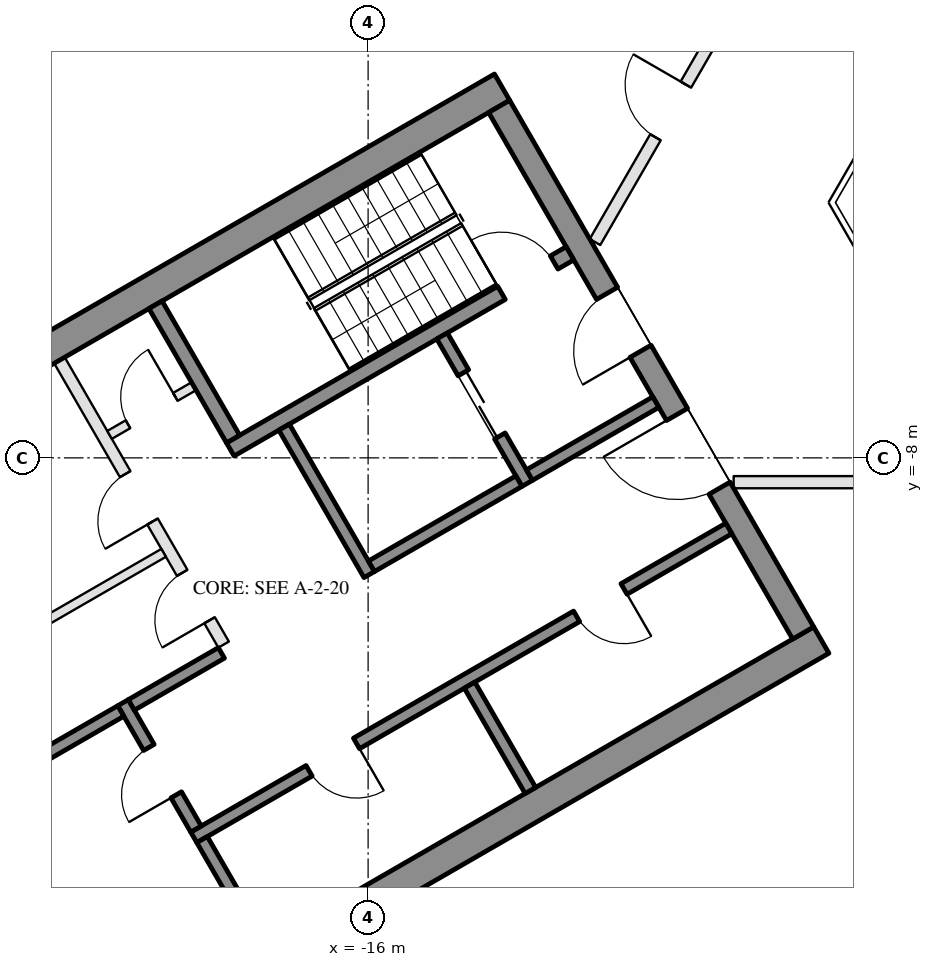
"""IFC4 building model, lengths in metres.
Left out: names, types, materials, properties, quantities, classifications, styles, units other than length and angle.
Written with IfcOpenShell. Run it as: python <this file> out.ifc"""

import sys

from ifc_helpers import new_model, si_unit, direction, frame, frame_2d, origin, place, context, subcontext, project, spatial, rectangle, extrude, element, fill, save


model = new_model("IFC4")
c1 = context("Model", 3, precision=1e-05, world=origin(), true_north=direction((0.0, 1.0)))
c2 = subcontext(c1, "Body", "Model", "MODEL_VIEW")
j1 = project(units=[si_unit("LENGTHUNIT", "METRE"), si_unit("PLANEANGLEUNIT", "RADIAN")], contexts=[c1])
p1 = place(None, origin())
s1 = spatial("IfcSite", under=j1, at=p1, CompositionType="ELEMENT")
p2 = place(p1, origin())
s2 = spatial("IfcBuilding", under=s1, at=p2, CompositionType="ELEMENT")
p3 = place(p2, frame((0.0, 0.0, 94.6)))
s3 = spatial("IfcBuildingStorey", under=s2, at=p3, CompositionType="ELEMENT", Elevation=94.6)
p4 = place(p3, frame((-20.309, 1.934, 0.0), z_axis=(0.0, 0.0, 1.0), x_axis=(-0.499992114976, -0.866029956157, 0.0)))
e1 = element("IfcWall", 1, at=p4, inside=s3, PredefinedType="SOLIDWALL", context=c2, shape_type="SweptSolid", body=[
    extrude(rectangle(XDim=6.74, YDim=0.35, at=frame_2d((3.37, 0.0))), origin(), (0.0, 0.0, 1.0), 3.55),
])
p5 = place(p4, frame((4.02, 0.0, 0.0)))
e2 = element("IfcOpeningElement", 2, at=p5, cuts=e1, PredefinedType="OPENING", context=c2, shape_type="SweptSolid", body=[
    extrude(rectangle(XDim=2.4, YDim=2.4, at=frame_2d((1.2, 1.2))), frame((0.0, 0.185, 0.0), z_axis=(0.0, -1.0, 0.0), x_axis=(1.0, 0.0, 0.0)), (0.0, 0.0, 1.0), 0.37),
])
p6 = place(p4, frame((0.77, 0.0, 0.3)))
e3 = element("IfcOpeningElement", 3, at=p6, cuts=e1, PredefinedType="OPENING", context=c2, shape_type="SweptSolid", body=[
    extrude(rectangle(XDim=2.9, YDim=2.65, at=frame_2d((1.45, 1.325))), frame((0.0, 0.185, 0.0), z_axis=(0.0, -1.0, 0.0), x_axis=(1.0, 0.0, 0.0)), (0.0, 0.0, 1.0), 0.37),
])
for number, where, z_axis, x_axis in (
    (4, (-13.797, -1.903, 0.0), (0.0, 0.0, 1.0), (-0.866, -0.5, 0.0)),
    (5, (-8.547, -10.997, 0.0), (0.0, 0.0, 1.0), (-0.866, -0.5, 0.0)),
):
    element("IfcWall", number, at=place(p3, frame(where, z_axis=z_axis, x_axis=x_axis)), inside=s3, PredefinedType="SHEAR", context=c2, shape_type="SweptSolid", body=[
        extrude(rectangle(XDim=14.837, YDim=0.5, at=frame_2d((7.418, 0.0))), origin(), (0.0, 0.0, 1.0), 3.5),
    ])
p7 = place(p3, frame((-13.845, -2.22, 0.0), z_axis=(0.0, 0.0, 1.0), x_axis=(0.500004234368, -0.866022959057, 0.0)))
e6 = element("IfcWall", 6, at=p7, inside=s3, PredefinedType="SHEAR", context=c2, shape_type="SweptSolid", body=[
    extrude(rectangle(XDim=10.0, YDim=0.4, at=frame_2d((5.0, 0.0))), origin(), (0.0, 0.0, 1.0), 3.5),
])
p8 = place(p7, frame((3.55, 0.0, 0.0)))
e7 = element("IfcOpeningElement", 7, at=p8, cuts=e6, PredefinedType="OPENING", context=c2, shape_type="SweptSolid", body=[
    extrude(rectangle(XDim=1.1, YDim=2.1, at=frame_2d((0.55, 1.05))), frame((0.0, 0.21, 0.0), z_axis=(0.0, -1.0, 0.0), x_axis=(1.0, 0.0, 0.0)), (0.0, 0.0, 1.0), 0.42),
])
p9 = place(p7, frame((5.85, 0.0, 0.0)))
e8 = element("IfcOpeningElement", 8, at=p9, cuts=e6, PredefinedType="OPENING", context=c2, shape_type="SweptSolid", body=[
    extrude(rectangle(XDim=1.4, YDim=2.1, at=frame_2d((0.7, 1.05))), frame((0.0, 0.21, 0.0), z_axis=(0.0, -1.0, 0.0), x_axis=(1.0, 0.0, 0.0)), (0.0, 0.0, 1.0), 0.42),
])
p10 = place(p3, frame((-12.681, -4.636, 0.0), z_axis=(0.0, 0.0, 1.0), x_axis=(-0.866021702275, -0.500006411147, 0.0)))
e9 = element("IfcWall", 9, at=p10, inside=s3, PredefinedType="SHEAR", context=c2, shape_type="SweptSolid", body=[
    extrude(rectangle(XDim=6.45, YDim=0.25, at=frame_2d((3.225, 0.0))), origin(), (0.0, 0.0, 1.0), 3.5),
])
p11 = place(p10, frame((0.3, 0.0, 0.0)))
e10 = element("IfcOpeningElement", 10, at=p11, cuts=e9, PredefinedType="OPENING", context=c2, shape_type="SweptSolid", body=[
    extrude(rectangle(XDim=1.0, YDim=2.1, at=frame_2d((0.5, 1.05))), frame((0.0, 0.135, 0.0), z_axis=(0.0, -1.0, 0.0), x_axis=(1.0, 0.0, 0.0)), (0.0, 0.0, 1.0), 0.27),
])
p12 = place(p3, frame((-19.496, -5.482, 0.0), z_axis=(0.0, 0.0, 1.0), x_axis=(0.499990435942, -0.866030925526, 0.0)))
e11 = element("IfcWall", 11, at=p12, inside=s3, PredefinedType="SHEAR", context=c2, shape_type="SweptSolid", body=[
    extrude(rectangle(XDim=2.55, YDim=0.25, at=frame_2d((1.275, 0.0))), origin(), (0.0, 0.0, 1.0), 3.5),
])
p13 = place(p3, frame((-17.381, -7.495, 0.0), z_axis=(0.0, 0.0, 1.0), x_axis=(0.500011755427, -0.866018616679, 0.0)))
e12 = element("IfcWall", 12, at=p13, inside=s3, PredefinedType="SHEAR", context=c2, shape_type="SweptSolid", body=[
    extrude(rectangle(XDim=2.8, YDim=0.2, at=frame_2d((1.4, 0.0))), origin(), (0.0, 0.0, 1.0), 3.5),
])
p14 = place(p3, frame((-14.783, -5.995, 0.0), z_axis=(0.0, 0.0, 1.0), x_axis=(0.49994636267, -0.866056369097, 0.0)))
e13 = element("IfcWall", 13, at=p14, inside=s3, PredefinedType="SHEAR", context=c2, shape_type="SweptSolid", body=[
    extrude(rectangle(XDim=2.8, YDim=0.2, at=frame_2d((1.4, 0.0))), origin(), (0.0, 0.0, 1.0), 3.5),
])
p15 = place(p14, frame((0.7, 0.0, 0.0)))
e14 = element("IfcOpeningElement", 14, at=p15, cuts=e13, PredefinedType="OPENING", context=c2, shape_type="SweptSolid", body=[
    extrude(rectangle(XDim=1.2, YDim=2.1, at=frame_2d((0.6, 1.05))), frame((0.0, 0.11, 0.0), z_axis=(0.0, -1.0, 0.0), x_axis=(1.0, 0.0, 0.0)), (0.0, 0.0, 1.0), 0.22),
])
p16 = place(p3, frame((-13.52, -8.383, 0.0), z_axis=(0.0, 0.0, 1.0), x_axis=(-0.866034573852, -0.49998411664, 0.0)))
e15 = element("IfcWall", 15, at=p16, inside=s3, PredefinedType="SHEAR", context=c2, shape_type="SweptSolid", body=[
    extrude(rectangle(XDim=2.8, YDim=0.2, at=frame_2d((1.4, 0.0))), origin(), (0.0, 0.0, 1.0), 3.5),
])
p17 = place(p3, frame((-11.268, -7.083, 0.0), z_axis=(0.0, 0.0, 1.0), x_axis=(-0.866050077142, -0.499957262057, 0.0)))
e16 = element("IfcWall", 16, at=p17, inside=s3, PredefinedType="SHEAR", context=c2, shape_type="SweptSolid", body=[
    extrude(rectangle(XDim=2.4, YDim=0.2, at=frame_2d((1.2, 0.0))), origin(), (0.0, 0.0, 1.0), 3.5),
])
p18 = place(p3, frame((-10.068, -9.162, 0.0), z_axis=(0.0, 0.0, 1.0), x_axis=(-0.866032725843, -0.499987317609, 0.0)))
e17 = element("IfcWall", 17, at=p18, inside=s3, PredefinedType="SHEAR", context=c2, shape_type="SweptSolid", body=[
    extrude(rectangle(XDim=10.16, YDim=0.2, at=frame_2d((5.08, 0.0))), origin(), (0.0, 0.0, 1.0), 3.5),
])
p19 = place(p18, frame((1.99, 0.0, 0.0)))
e18 = element("IfcOpeningElement", 18, at=p19, cuts=e17, PredefinedType="OPENING", context=c2, shape_type="SweptSolid", body=[
    extrude(rectangle(XDim=0.9, YDim=2.1, at=frame_2d((0.45, 1.05))), frame((0.0, 0.11, 0.0), z_axis=(0.0, -1.0, 0.0), x_axis=(1.0, 0.0, 0.0)), (0.0, 0.0, 1.0), 0.22),
])
p20 = place(p18, frame((7.07, 0.0, 0.0)))
e19 = element("IfcOpeningElement", 19, at=p20, cuts=e17, PredefinedType="OPENING", context=c2, shape_type="SweptSolid", body=[
    extrude(rectangle(XDim=0.9, YDim=2.1, at=frame_2d((0.45, 1.05))), frame((0.0, 0.11, 0.0), z_axis=(0.0, -1.0, 0.0), x_axis=(1.0, 0.0, 0.0)), (0.0, 0.0, 1.0), 0.22),
])
p21 = place(p3, frame((-20.031, -12.026, 0.0), z_axis=(0.0, 0.0, 1.0), x_axis=(0.500033551112, -0.866006032174, 0.0)))
e20 = element("IfcWall", 20, at=p21, inside=s3, PredefinedType="SHEAR", context=c2, shape_type="SweptSolid", body=[
    extrude(rectangle(XDim=2.4, YDim=0.2, at=frame_2d((1.2, 0.0))), origin(), (0.0, 0.0, 1.0), 3.5),
])
p22 = place(p21, frame((0.85, 0.0, 0.0)))
e21 = element("IfcOpeningElement", 21, at=p22, cuts=e20, PredefinedType="OPENING", context=c2, shape_type="SweptSolid", body=[
    extrude(rectangle(XDim=0.9, YDim=2.1, at=frame_2d((0.45, 1.05))), frame((0.0, 0.11, 0.0), z_axis=(0.0, -1.0, 0.0), x_axis=(1.0, 0.0, 0.0)), (0.0, 0.0, 1.0), 0.22),
])
p23 = place(p3, frame((-18.413, -11.208, 0.0), z_axis=(0.0, 0.0, 1.0), x_axis=(-0.866038183914, -0.499977863513, 0.0)))
e22 = element("IfcWall", 22, at=p23, inside=s3, PredefinedType="SHEAR", context=c2, shape_type="SweptSolid", body=[
    extrude(rectangle(XDim=1.71, YDim=0.2, at=frame_2d((0.855, 0.0))), origin(), (0.0, 0.0, 1.0), 3.5),
])
for number, where, z_axis, x_axis in (
    (23, (-14.331, -11.738, 0.0), (0.0, 0.0, 1.0), (0.5, -0.866, 0.0)),
    (24, (-18.73, -14.278, 0.0), (0.0, 0.0, 1.0), (0.5, -0.866, 0.0)),
):
    element("IfcWall", number, at=place(p3, frame(where, z_axis=z_axis, x_axis=x_axis)), inside=s3, PredefinedType="SHEAR", context=c2, shape_type="SweptSolid", body=[
        extrude(rectangle(XDim=2.0, YDim=0.2, at=frame_2d((1.0, 0.0))), origin(), (0.0, 0.0, 1.0), 3.5),
    ])
p24 = place(p3, frame((-20.067, -12.163, 0.0), z_axis=(0.0, 0.0, 1.0), x_axis=(-0.866060851709, -0.499938597367, 0.0)))
e25 = element("IfcWall", 25, at=p24, inside=s3, PredefinedType="SHEAR", context=c2, shape_type="SweptSolid", body=[
    extrude(rectangle(XDim=2.64, YDim=0.2, at=frame_2d((1.32, 0.0))), origin(), (0.0, 0.0, 1.0), 3.5),
])
p25 = place(p3, frame((-21.076, -6.395, 0.0), z_axis=(0.0, 0.0, 1.0), x_axis=(0.50001468107, -0.866016927499, 0.0)))
e26 = element("IfcWall", 26, at=p25, inside=s3, PredefinedType="PARTITIONING", context=c2, shape_type="SweptSolid", body=[
    extrude(rectangle(XDim=5.4, YDim=0.2, at=frame_2d((2.7, 0.0))), origin(), (0.0, 0.0, 1.0), 3.5),
])
p26 = place(p25, frame((2.163, 0.0, 0.0)))
e27 = element("IfcOpeningElement", 27, at=p26, cuts=e26, PredefinedType="OPENING", context=c2, shape_type="SweptSolid", body=[
    extrude(rectangle(XDim=0.9, YDim=2.1, at=frame_2d((0.45, 1.05))), frame((0.0, 0.11, 0.0), z_axis=(0.0, -1.0, 0.0), x_axis=(1.0, 0.0, 0.0)), (0.0, 0.0, 1.0), 0.22),
])
p27 = place(p25, frame((4.038, 0.0, 0.0)))
e28 = element("IfcOpeningElement", 28, at=p27, cuts=e26, PredefinedType="OPENING", context=c2, shape_type="SweptSolid", body=[
    extrude(rectangle(XDim=0.9, YDim=2.1, at=frame_2d((0.45, 1.05))), frame((0.0, 0.11, 0.0), z_axis=(0.0, -1.0, 0.0), x_axis=(1.0, 0.0, 0.0)), (0.0, 0.0, 1.0), 0.22),
])
p28 = place(p3, frame((-18.866, -6.822, 0.0), z_axis=(0.0, 0.0, 1.0), x_axis=(-0.866028054938, -0.499995408039, 0.0)))
e29 = element("IfcWall", 29, at=p28, inside=s3, PredefinedType="PARTITIONING", context=c2, shape_type="SweptSolid", body=[
    extrude(rectangle(XDim=1.6, YDim=0.15, at=frame_2d((0.8, 0.0))), origin(), (0.0, 0.0, 1.0), 3.5),
])
p29 = place(p28, frame((0.35, 0.0, 0.0)))
e30 = element("IfcOpeningElement", 30, at=p29, cuts=e29, PredefinedType="OPENING", context=c2, shape_type="SweptSolid", body=[
    extrude(rectangle(XDim=0.9, YDim=2.1, at=frame_2d((0.45, 1.05))), frame((0.0, 0.085, 0.0), z_axis=(0.0, -1.0, 0.0), x_axis=(1.0, 0.0, 0.0)), (0.0, 0.0, 1.0), 0.17),
])
p30 = place(p3, frame((-19.363, -9.562, 0.0), z_axis=(0.0, 0.0, 1.0), x_axis=(-0.86601185002, -0.500023475074, 0.0)))
e31 = element("IfcWall", 31, at=p30, inside=s3, PredefinedType="PARTITIONING", context=c2, shape_type="SweptSolid", body=[
    extrude(rectangle(XDim=4.61, YDim=0.15, at=frame_2d((2.305, 0.0))), origin(), (0.0, 0.0, 1.0), 3.5),
])
p31 = place(p3, frame((-3.703, -8.4, 0.0), z_axis=(0.0, 0.0, 1.0), x_axis=(-1.0, 0.0, 0.0)))
e32 = element("IfcWall", 32, at=p31, inside=s3, PredefinedType="PARTITIONING", context=c2, shape_type="SweptSolid", body=[
    extrude(rectangle(XDim=6.285, YDim=0.2, at=frame_2d((3.143, 0.0))), origin(), (0.0, 0.0, 1.0), 2.95),
])
p32 = place(p31, frame((2.642, 0.0, 0.0)))
e33 = element("IfcOpeningElement", 33, at=p32, cuts=e32, PredefinedType="OPENING", context=c2, shape_type="SweptSolid", body=[
    extrude(rectangle(XDim=1.0, YDim=2.1, at=frame_2d((0.5, 1.05))), frame((0.0, 0.11, 0.0), z_axis=(0.0, -1.0, 0.0), x_axis=(1.0, 0.0, 0.0)), (0.0, 0.0, 1.0), 0.22),
])
p33 = place(p3, frame((-12.269, -4.45, 0.0), z_axis=(0.0, 0.0, 1.0), x_axis=(0.500015331954, 0.866016551696, 0.0)))
e34 = element("IfcWall", 34, at=p33, inside=s3, PredefinedType="PARTITIONING", context=c2, shape_type="SweptSolid", body=[
    extrude(rectangle(XDim=4.979, YDim=0.2, at=frame_2d((2.489, 0.0))), origin(), (0.0, 0.0, 1.0), 2.95),
])
p34 = place(p33, frame((1.99, 0.0, 0.0)))
e35 = element("IfcOpeningElement", 35, at=p34, cuts=e34, PredefinedType="OPENING", context=c2, shape_type="SweptSolid", body=[
    extrude(rectangle(XDim=1.0, YDim=2.1, at=frame_2d((0.5, 1.05))), frame((0.0, 0.11, 0.0), z_axis=(0.0, -1.0, 0.0), x_axis=(1.0, 0.0, 0.0)), (0.0, 0.0, 1.0), 0.22),
])
p35 = place(p15, origin())
e36 = element("IfcDoor", 36, at=p35, inside=s3, OperationType="DOUBLE_DOOR_SLIDING", PredefinedType="DOOR", context=c2, shape_type="SweptSolid", body=[
    extrude(rectangle(XDim=1.2, YDim=2.1, at=frame_2d((0.6, 1.05))), frame((0.0, 0.025, 0.0), z_axis=(0.0, -1.0, 0.0), x_axis=(1.0, 0.0, 0.0)), (0.0, 0.0, 1.0), 0.05),
])
fill(e14, e36)
p36 = place(p29, frame((0.9, 0.0, 0.0), z_axis=(0.0, 0.0, 1.0), x_axis=(-1.0, 0.0, 0.0)))
e37 = element("IfcDoor", 37, at=p36, inside=s3, OperationType="SINGLE_SWING_RIGHT", PredefinedType="DOOR", context=c2, shape_type="SweptSolid", body=[
    extrude(rectangle(XDim=0.9, YDim=2.1, at=frame_2d((0.45, 1.05))), frame((0.0, 0.025, 0.0), z_axis=(0.0, -1.0, 0.0), x_axis=(1.0, 0.0, 0.0)), (0.0, 0.0, 1.0), 0.05),
])
fill(e30, e37)
p37 = place(p19, origin())
e38 = element("IfcDoor", 38, at=p37, inside=s3, OperationType="SINGLE_SWING_LEFT", PredefinedType="DOOR", context=c2, shape_type="SweptSolid", body=[
    extrude(rectangle(XDim=0.9, YDim=2.1, at=frame_2d((0.45, 1.05))), frame((0.0, 0.025, 0.0), z_axis=(0.0, -1.0, 0.0), x_axis=(1.0, 0.0, 0.0)), (0.0, 0.0, 1.0), 0.05),
])
fill(e18, e38)
p38 = place(p20, origin())
e39 = element("IfcDoor", 39, at=p38, inside=s3, OperationType="SINGLE_SWING_LEFT", PredefinedType="DOOR", context=c2, shape_type="SweptSolid", body=[
    extrude(rectangle(XDim=0.9, YDim=2.1, at=frame_2d((0.45, 1.05))), frame((0.0, 0.025, 0.0), z_axis=(0.0, -1.0, 0.0), x_axis=(1.0, 0.0, 0.0)), (0.0, 0.0, 1.0), 0.05),
])
fill(e19, e39)
p39 = place(p22, frame((0.9, 0.0, 0.0), z_axis=(0.0, 0.0, 1.0), x_axis=(-1.0, 0.0, 0.0)))
e40 = element("IfcDoor", 40, at=p39, inside=s3, OperationType="SINGLE_SWING_LEFT", PredefinedType="DOOR", context=c2, shape_type="SweptSolid", body=[
    extrude(rectangle(XDim=0.9, YDim=2.1, at=frame_2d((0.45, 1.05))), frame((0.0, 0.025, 0.0), z_axis=(0.0, -1.0, 0.0), x_axis=(1.0, 0.0, 0.0)), (0.0, 0.0, 1.0), 0.05),
])
fill(e21, e40)
p40 = place(p26, frame((0.9, 0.0, 0.0), z_axis=(0.0, 0.0, 1.0), x_axis=(-1.0, 0.0, 0.0)))
e41 = element("IfcDoor", 41, at=p40, inside=s3, OperationType="SINGLE_SWING_LEFT", PredefinedType="DOOR", context=c2, shape_type="SweptSolid", body=[
    extrude(rectangle(XDim=0.9, YDim=2.1, at=frame_2d((0.45, 1.05))), frame((0.0, 0.025, 0.0), z_axis=(0.0, -1.0, 0.0), x_axis=(1.0, 0.0, 0.0)), (0.0, 0.0, 1.0), 0.05),
])
fill(e27, e41)
p41 = place(p27, frame((0.9, 0.0, 0.0), z_axis=(0.0, 0.0, 1.0), x_axis=(-1.0, 0.0, 0.0)))
e42 = element("IfcDoor", 42, at=p41, inside=s3, OperationType="SINGLE_SWING_LEFT", PredefinedType="DOOR", context=c2, shape_type="SweptSolid", body=[
    extrude(rectangle(XDim=0.9, YDim=2.1, at=frame_2d((0.45, 1.05))), frame((0.0, 0.025, 0.0), z_axis=(0.0, -1.0, 0.0), x_axis=(1.0, 0.0, 0.0)), (0.0, 0.0, 1.0), 0.05),
])
fill(e28, e42)
p42 = place(p8, frame((1.1, 0.0, 0.0), z_axis=(0.0, 0.0, 1.0), x_axis=(-1.0, 0.0, 0.0)))
e43 = element("IfcDoor", 43, at=p42, inside=s3, OperationType="SINGLE_SWING_LEFT", PredefinedType="DOOR", context=c2, shape_type="SweptSolid", body=[
    extrude(rectangle(XDim=1.1, YDim=2.1, at=frame_2d((0.55, 1.05))), frame((0.0, 0.025, 0.0), z_axis=(0.0, -1.0, 0.0), x_axis=(1.0, 0.0, 0.0)), (0.0, 0.0, 1.0), 0.05),
])
fill(e7, e43)
p43 = place(p9, frame((1.4, 0.0, 0.0), z_axis=(0.0, 0.0, 1.0), x_axis=(-1.0, 0.0, 0.0)))
e44 = element("IfcDoor", 44, at=p43, inside=s3, OperationType="DOUBLE_DOOR_SINGLE_SWING", PredefinedType="DOOR", context=c2, shape_type="SweptSolid", body=[
    extrude(rectangle(XDim=1.4, YDim=2.1, at=frame_2d((0.7, 1.05))), frame((0.0, 0.025, 0.0), z_axis=(0.0, -1.0, 0.0), x_axis=(1.0, 0.0, 0.0)), (0.0, 0.0, 1.0), 0.05),
])
fill(e8, e44)
p44 = place(p11, frame((1.0, 0.0, 0.0), z_axis=(0.0, 0.0, 1.0), x_axis=(-1.0, 0.0, 0.0)))
e45 = element("IfcDoor", 45, at=p44, inside=s3, OperationType="SINGLE_SWING_LEFT", PredefinedType="DOOR", context=c2, shape_type="SweptSolid", body=[
    extrude(rectangle(XDim=1.0, YDim=2.1, at=frame_2d((0.5, 1.05))), frame((0.0, 0.025, 0.0), z_axis=(0.0, -1.0, 0.0), x_axis=(1.0, 0.0, 0.0)), (0.0, 0.0, 1.0), 0.05),
])
fill(e10, e45)
p45 = place(p34, origin())
e46 = element("IfcDoor", 46, at=p45, inside=s3, OperationType="SINGLE_SWING_RIGHT", PredefinedType="DOOR", context=c2, shape_type="SweptSolid", body=[
    extrude(rectangle(XDim=1.0, YDim=2.1, at=frame_2d((0.5, 1.05))), frame((0.0, 0.025, 0.0), z_axis=(0.0, -1.0, 0.0), x_axis=(1.0, 0.0, 0.0)), (0.0, 0.0, 1.0), 0.05),
])
fill(e35, e46)
save(model, sys.argv[1])
